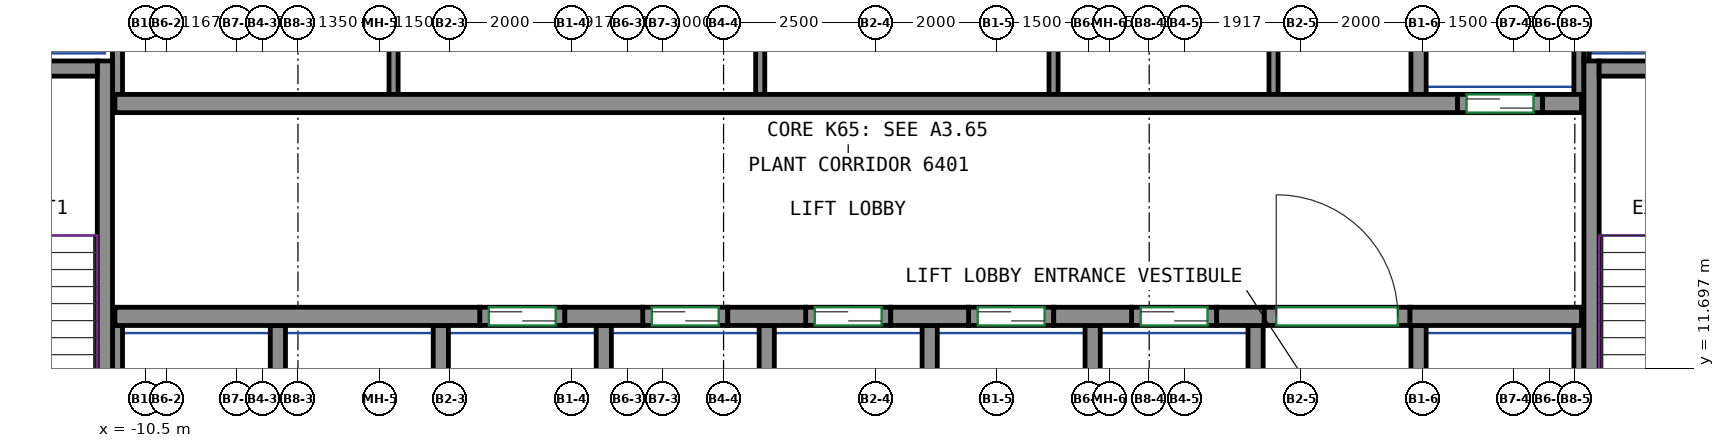
"""IFC4 building model, lengths in metres.
Left out: names, types, materials, properties, quantities, classifications, styles, units other than length and angle.
Written with IfcOpenShell. Run it as: python <this file> out.ifc"""

import sys

from ifc_helpers import new_model, si_unit, direction, frame, frame_2d, origin, place, context, subcontext, project, spatial, rectangle, extrude, source, transform, mapped, element, fill, save


model = new_model("IFC4")
c1 = context("Model", 3, precision=1e-05, world=origin(), true_north=direction((0.0, 1.0)))
c2 = subcontext(c1, "Body", "Model", "MODEL_VIEW")
j1 = project(units=[si_unit("LENGTHUNIT", "METRE"), si_unit("PLANEANGLEUNIT", "RADIAN")], contexts=[c1])
p1 = place(None, origin())
s1 = spatial("IfcSite", under=j1, at=p1, CompositionType="ELEMENT")
p2 = place(p1, origin())
s2 = spatial("IfcBuilding", under=s1, at=p2, CompositionType="ELEMENT")
p3 = place(p2, frame((0.0, 0.0, 262.8)))
s3 = spatial("IfcBuildingStorey", under=s2, at=p3, CompositionType="ELEMENT", Elevation=262.8)
m1 = source(origin(), c2, "Body", "SweptSolid", [
    extrude(rectangle(XDim=7.75, YDim=0.25, at=frame_2d((3.875, 0.0))), origin(), (0.0, 0.0, 1.0), 3.8),
])
p4 = place(p3, frame((-11.175, 9.0, 0.0), z_axis=(0.0, 0.0, 1.0), x_axis=(0.0, 1.0, 0.0)))
e1 = element("IfcWall", 1, at=p4, inside=s3, PredefinedType="SHEAR", context=c2, shape_type="MappedRepresentation", body=[
    mapped(m1, transform((0.0, 0.0, 0.0))),
])
m2 = source(origin(), c2, "Body", "SweptSolid", [
    extrude(rectangle(XDim=3.7, YDim=0.25, at=frame_2d((1.85, 0.0))), origin(), (0.0, 0.0, 1.0), 3.8),
])
p5 = place(p3, frame((-15.0, 16.625, 0.0), z_axis=(0.0, 0.0, 1.0), x_axis=(1.0, 0.0, 0.0)))
e2 = element("IfcWall", 2, at=p5, inside=s3, PredefinedType="SHEAR", context=c2, shape_type="MappedRepresentation", body=[
    mapped(m2, transform((0.0, 0.0, 0.0))),
])
p6 = place(p3, frame((13.275, 9.0, 0.0), z_axis=(0.0, 0.0, 1.0), x_axis=(0.0, 1.0, 0.0)))
e3 = element("IfcWall", 3, at=p6, inside=s3, PredefinedType="SHEAR", context=c2, shape_type="MappedRepresentation", body=[
    mapped(m1, transform((0.0, 0.0, 0.0))),
])
m3 = source(origin(), c2, "Body", "SweptSolid", [
    extrude(rectangle(XDim=3.7, YDim=0.25, at=frame_2d((1.85, 0.0))), origin(), (0.0, 0.0, 1.0), 3.8),
])
p7 = place(p3, frame((13.4, 16.625, 0.0), z_axis=(0.0, 0.0, 1.0), x_axis=(1.0, 0.0, 0.0)))
e4 = element("IfcWall", 4, at=p7, inside=s3, PredefinedType="SHEAR", context=c2, shape_type="MappedRepresentation", body=[
    mapped(m3, transform((0.0, 0.0, 0.0))),
])
m4 = source(origin(), c2, "Body", "SweptSolid", [
    extrude(rectangle(XDim=6.0, YDim=0.3, at=frame_2d((3.0, 0.0))), origin(), (0.0, 0.0, 1.0), 3.8),
])
p8 = place(p3, frame((-11.01, 12.55, 0.0), z_axis=(0.0, 0.0, 1.0), x_axis=(1.0, 0.0, 0.0)))
e5 = element("IfcWall", 5, at=p8, inside=s3, PredefinedType="SHEAR", context=c2, shape_type="MappedRepresentation", body=[
    mapped(m4, transform((0.0, 0.0, 0.0))),
])
m5 = source(origin(), c2, "Body", "SweptSolid", [
    extrude(rectangle(XDim=1.28, YDim=0.3, at=frame_2d((0.64, 0.0))), origin(), (0.0, 0.0, 1.0), 3.8),
])
for number, where, z_axis, x_axis in (
    (6, (-3.61, 12.55, 0.0), (0.0, 0.0, 1.0), (1.0, 0.0, 0.0)),
    (7, (-0.93, 12.55, 0.0), (0.0, 0.0, 1.0), (1.0, 0.0, 0.0)),
    (8, (1.75, 12.55, 0.0), (0.0, 0.0, 1.0), (1.0, 0.0, 0.0)),
    (9, (4.43, 12.55, 0.0), (0.0, 0.0, 1.0), (1.0, 0.0, 0.0)),
):
    element("IfcWall", number, at=place(p3, frame(where, z_axis=z_axis, x_axis=x_axis)), inside=s3, PredefinedType="SHEAR", context=c2, shape_type="MappedRepresentation", body=[
        mapped(m5, transform((0.0, 0.0, 0.0))),
    ])
m6 = source(origin(), c2, "Body", "SweptSolid", [
    extrude(rectangle(XDim=0.78, YDim=0.3, at=frame_2d((0.39, 0.0))), origin(), (0.0, 0.0, 1.0), 3.8),
])
p9 = place(p3, frame((7.11, 12.55, 0.0), z_axis=(0.0, 0.0, 1.0), x_axis=(1.0, 0.0, 0.0)))
e10 = element("IfcWall", 10, at=p9, inside=s3, PredefinedType="SHEAR", context=c2, shape_type="MappedRepresentation", body=[
    mapped(m6, transform((0.0, 0.0, 0.0))),
])
m7 = source(origin(), c2, "Body", "SweptSolid", [
    extrude(rectangle(XDim=2.82, YDim=0.3, at=frame_2d((1.41, 0.0))), origin(), (0.0, 0.0, 1.0), 3.8),
])
p10 = place(p3, frame((10.29, 12.55, 0.0), z_axis=(0.0, 0.0, 1.0), x_axis=(1.0, 0.0, 0.0)))
e11 = element("IfcWall", 11, at=p10, inside=s3, PredefinedType="SHEAR", context=c2, shape_type="MappedRepresentation", body=[
    mapped(m7, transform((0.0, 0.0, 0.0))),
])
m8 = source(origin(), c2, "Body", "SweptSolid", [
    extrude(rectangle(XDim=22.08, YDim=0.3, at=frame_2d((11.04, 0.0))), origin(), (0.0, 0.0, 1.0), 3.8),
])
p11 = place(p3, frame((-11.01, 16.05, 0.0), z_axis=(0.0, 0.0, 1.0), x_axis=(1.0, 0.0, 0.0)))
e12 = element("IfcWall", 12, at=p11, inside=s3, PredefinedType="SHEAR", context=c2, shape_type="MappedRepresentation", body=[
    mapped(m8, transform((0.0, 0.0, 0.0))),
])
m9 = source(origin(), c2, "Body", "SweptSolid", [
    extrude(rectangle(XDim=0.64, YDim=0.3, at=frame_2d((0.32, 0.0))), origin(), (0.0, 0.0, 1.0), 3.8),
])
p12 = place(p3, frame((12.47, 16.05, 0.0), z_axis=(0.0, 0.0, 1.0), x_axis=(1.0, 0.0, 0.0)))
e13 = element("IfcWall", 13, at=p12, inside=s3, PredefinedType="SHEAR", context=c2, shape_type="MappedRepresentation", body=[
    mapped(m9, transform((0.0, 0.0, 0.0))),
])
m10 = source(origin(), c2, "Body", "SweptSolid", [
    extrude(rectangle(XDim=1.4, YDim=0.3, at=frame_2d((0.7, 0.0))), origin(), (0.0, 0.0, 1.0), 3.8),
])
p13 = place(p3, frame((-5.01, 12.55, 0.0), z_axis=(0.0, 0.0, 1.0), x_axis=(1.0, 0.0, 0.0)))
e14 = element("IfcWall", 14, at=p13, inside=s3, PredefinedType="PARTITIONING", context=c2, shape_type="MappedRepresentation", body=[
    mapped(m10, transform((0.0, 0.0, 0.0))),
])
p14 = place(p13, frame((0.15, 0.0, 0.0)))
e15 = element("IfcOpeningElement", 15, at=p14, cuts=e14, PredefinedType="OPENING", context=c2, shape_type="SweptSolid", body=[
    extrude(rectangle(XDim=1.1, YDim=2.1, at=frame_2d((0.55, 1.05))), frame((0.0, 0.16, 0.0), z_axis=(0.0, -1.0, 0.0), x_axis=(1.0, 0.0, 0.0)), (0.0, 0.0, 1.0), 0.32),
])
m11 = source(origin(), c2, "Body", "SweptSolid", [
    extrude(rectangle(XDim=1.4, YDim=0.3, at=frame_2d((0.7, 0.0))), origin(), (0.0, 0.0, 1.0), 3.8),
])
p15 = place(p3, frame((-2.33, 12.55, 0.0), z_axis=(0.0, 0.0, 1.0), x_axis=(1.0, 0.0, 0.0)))
e16 = element("IfcWall", 16, at=p15, inside=s3, PredefinedType="PARTITIONING", context=c2, shape_type="MappedRepresentation", body=[
    mapped(m11, transform((0.0, 0.0, 0.0))),
])
p16 = place(p15, frame((0.15, 0.0, 0.0)))
e17 = element("IfcOpeningElement", 17, at=p16, cuts=e16, PredefinedType="OPENING", context=c2, shape_type="SweptSolid", body=[
    extrude(rectangle(XDim=1.1, YDim=2.1, at=frame_2d((0.55, 1.05))), frame((0.0, 0.16, 0.0), z_axis=(0.0, -1.0, 0.0), x_axis=(1.0, 0.0, 0.0)), (0.0, 0.0, 1.0), 0.32),
])
p17 = place(p3, frame((0.35, 12.55, 0.0), z_axis=(0.0, 0.0, 1.0), x_axis=(1.0, 0.0, 0.0)))
e18 = element("IfcWall", 18, at=p17, inside=s3, PredefinedType="PARTITIONING", context=c2, shape_type="MappedRepresentation", body=[
    mapped(m10, transform((0.0, 0.0, 0.0))),
])
p18 = place(p17, frame((0.15, 0.0, 0.0)))
e19 = element("IfcOpeningElement", 19, at=p18, cuts=e18, PredefinedType="OPENING", context=c2, shape_type="SweptSolid", body=[
    extrude(rectangle(XDim=1.1, YDim=2.1, at=frame_2d((0.55, 1.05))), frame((0.0, 0.16, 0.0), z_axis=(0.0, -1.0, 0.0), x_axis=(1.0, 0.0, 0.0)), (0.0, 0.0, 1.0), 0.32),
])
p19 = place(p3, frame((3.03, 12.55, 0.0), z_axis=(0.0, 0.0, 1.0), x_axis=(1.0, 0.0, 0.0)))
e20 = element("IfcWall", 20, at=p19, inside=s3, PredefinedType="PARTITIONING", context=c2, shape_type="MappedRepresentation", body=[
    mapped(m10, transform((0.0, 0.0, 0.0))),
])
p20 = place(p19, frame((0.15, 0.0, 0.0)))
e21 = element("IfcOpeningElement", 21, at=p20, cuts=e20, PredefinedType="OPENING", context=c2, shape_type="SweptSolid", body=[
    extrude(rectangle(XDim=1.1, YDim=2.1, at=frame_2d((0.55, 1.05))), frame((0.0, 0.16, 0.0), z_axis=(0.0, -1.0, 0.0), x_axis=(1.0, 0.0, 0.0)), (0.0, 0.0, 1.0), 0.32),
])
p21 = place(p3, frame((5.71, 12.55, 0.0), z_axis=(0.0, 0.0, 1.0), x_axis=(1.0, 0.0, 0.0)))
e22 = element("IfcWall", 22, at=p21, inside=s3, PredefinedType="PARTITIONING", context=c2, shape_type="MappedRepresentation", body=[
    mapped(m11, transform((0.0, 0.0, 0.0))),
])
p22 = place(p21, frame((0.15, 0.0, 0.0)))
e23 = element("IfcOpeningElement", 23, at=p22, cuts=e22, PredefinedType="OPENING", context=c2, shape_type="SweptSolid", body=[
    extrude(rectangle(XDim=1.1, YDim=2.1, at=frame_2d((0.55, 1.05))), frame((0.0, 0.16, 0.0), z_axis=(0.0, -1.0, 0.0), x_axis=(1.0, 0.0, 0.0)), (0.0, 0.0, 1.0), 0.32),
])
p23 = place(p3, frame((11.07, 16.05, 0.0), z_axis=(0.0, 0.0, 1.0), x_axis=(1.0, 0.0, 0.0)))
e24 = element("IfcWall", 24, at=p23, inside=s3, PredefinedType="PARTITIONING", context=c2, shape_type="MappedRepresentation", body=[
    mapped(m10, transform((0.0, 0.0, 0.0))),
])
p24 = place(p23, frame((0.15, 0.0, 0.0)))
e25 = element("IfcOpeningElement", 25, at=p24, cuts=e24, PredefinedType="OPENING", context=c2, shape_type="SweptSolid", body=[
    extrude(rectangle(XDim=1.1, YDim=2.1, at=frame_2d((0.55, 1.05))), frame((0.0, 0.16, 0.0), z_axis=(0.0, -1.0, 0.0), x_axis=(1.0, 0.0, 0.0)), (0.0, 0.0, 1.0), 0.32),
])
m12 = source(origin(), c2, "Body", "SweptSolid", [
    extrude(rectangle(XDim=2.4, YDim=0.3, at=frame_2d((1.2, 0.0))), origin(), (0.0, 0.0, 1.0), 3.8),
])
p25 = place(p3, frame((7.89, 12.55, 0.0), z_axis=(0.0, 0.0, 1.0), x_axis=(1.0, 0.0, 0.0)))
e26 = element("IfcWall", 26, at=p25, inside=s3, PredefinedType="PARTITIONING", context=c2, shape_type="MappedRepresentation", body=[
    mapped(m12, transform((0.0, 0.0, 0.0))),
])
p26 = place(p25, frame((0.2, 0.0, 0.0)))
e27 = element("IfcOpeningElement", 27, at=p26, cuts=e26, PredefinedType="OPENING", context=c2, shape_type="SweptSolid", body=[
    extrude(rectangle(XDim=2.0, YDim=2.1, at=frame_2d((1.0, 1.05))), frame((0.0, 0.16, 0.0), z_axis=(0.0, -1.0, 0.0), x_axis=(1.0, 0.0, 0.0)), (0.0, 0.0, 1.0), 0.32),
])
m13 = source(origin(), c2, "Body", "SweptSolid", [
    extrude(rectangle(XDim=3.275, YDim=0.165, at=frame_2d((1.638, 0.0))), origin(), (0.0, 0.0, 1.0), 3.8),
])
p27 = place(p3, frame((13.067, 16.2, 0.0), z_axis=(0.0, 0.0, 1.0), x_axis=(0.0, 1.0, 0.0)))
e28 = element("IfcWall", 28, at=p27, inside=s3, PredefinedType="PARTITIONING", context=c2, shape_type="MappedRepresentation", body=[
    mapped(m13, transform((0.0, 0.0, 0.0))),
])
m14 = source(origin(), c2, "Body", "SweptSolid", [
    extrude(rectangle(XDim=4.8, YDim=0.165, at=frame_2d((2.4, 0.0))), origin(), (0.0, 0.0, 1.0), 3.8),
])
p28 = place(p3, frame((-10.968, 16.2, 0.0), z_axis=(0.0, 0.0, 1.0), x_axis=(0.0, 1.0, 0.0)))
e29 = element("IfcWall", 29, at=p28, inside=s3, PredefinedType="PARTITIONING", context=c2, shape_type="MappedRepresentation", body=[
    mapped(m14, transform((0.0, 0.0, 0.0))),
])
m15 = source(origin(), c2, "Body", "SweptSolid", [
    extrude(rectangle(XDim=3.275, YDim=0.25, at=frame_2d((1.638, 0.0))), origin(), (0.0, 0.0, 1.0), 3.8),
])
p29 = place(p3, frame((10.43, 16.2, 0.0), z_axis=(0.0, 0.0, 1.0), x_axis=(0.0, 1.0, 0.0)))
e30 = element("IfcWall", 30, at=p29, inside=s3, PredefinedType="PARTITIONING", context=c2, shape_type="MappedRepresentation", body=[
    mapped(m15, transform((0.0, 0.0, 0.0))),
])
m16 = source(origin(), c2, "Body", "SweptSolid", [
    extrude(rectangle(XDim=2.725, YDim=0.085, at=frame_2d((1.363, 0.0))), origin(), (0.0, 0.0, 1.0), 3.8),
])
p30 = place(p3, frame((13.192, 16.75, 0.0), z_axis=(0.0, 0.0, 1.0), x_axis=(0.0, 1.0, 0.0)))
e31 = element("IfcWall", 31, at=p30, inside=s3, PredefinedType="PARTITIONING", context=c2, shape_type="MappedRepresentation", body=[
    mapped(m16, transform((0.0, 0.0, 0.0))),
])
m17 = source(origin(), c2, "Body", "SweptSolid", [
    extrude(rectangle(XDim=3.4, YDim=0.25, at=frame_2d((1.7, 0.0))), origin(), (0.0, 0.0, 1.0), 3.8),
])
p31 = place(p3, frame((10.43, 9.0, 0.0), z_axis=(0.0, 0.0, 1.0), x_axis=(0.0, 1.0, 0.0)))
e32 = element("IfcWall", 32, at=p31, inside=s3, PredefinedType="PARTITIONING", context=c2, shape_type="MappedRepresentation", body=[
    mapped(m17, transform((0.0, 0.0, 0.0))),
])
m18 = source(origin(), c2, "Body", "SweptSolid", [
    extrude(rectangle(XDim=3.4, YDim=0.165, at=frame_2d((1.7, 0.0))), origin(), (0.0, 0.0, 1.0), 3.8),
])
p32 = place(p3, frame((13.067, 9.0, 0.0), z_axis=(0.0, 0.0, 1.0), x_axis=(0.0, 1.0, 0.0)))
e33 = element("IfcWall", 33, at=p32, inside=s3, PredefinedType="PARTITIONING", context=c2, shape_type="MappedRepresentation", body=[
    mapped(m18, transform((0.0, 0.0, 0.0))),
])
for number, where, z_axis, x_axis in (
    (34, (2.39, 9.0, 0.0), (0.0, 0.0, 1.0), (0.0, 1.0, 0.0)),
    (35, (5.07, 9.0, 0.0), (0.0, 0.0, 1.0), (0.0, 1.0, 0.0)),
    (36, (7.75, 9.0, 0.0), (0.0, 0.0, 1.0), (0.0, 1.0, 0.0)),
    (37, (-0.29, 9.0, 0.0), (0.0, 0.0, 1.0), (0.0, 1.0, 0.0)),
):
    element("IfcWall", number, at=place(p3, frame(where, z_axis=z_axis, x_axis=x_axis)), inside=s3, PredefinedType="PARTITIONING", context=c2, shape_type="MappedRepresentation", body=[
        mapped(m17, transform((0.0, 0.0, 0.0))),
    ])
p33 = place(p3, frame((-10.968, 9.0, 0.0), z_axis=(0.0, 0.0, 1.0), x_axis=(0.0, 1.0, 0.0)))
e38 = element("IfcWall", 38, at=p33, inside=s3, PredefinedType="PARTITIONING", context=c2, shape_type="MappedRepresentation", body=[
    mapped(m18, transform((0.0, 0.0, 0.0))),
])
for number, where, z_axis, x_axis in (
    (39, (-2.97, 9.0, 0.0), (0.0, 0.0, 1.0), (0.0, 1.0, 0.0)),
    (40, (-5.65, 9.0, 0.0), (0.0, 0.0, 1.0), (0.0, 1.0, 0.0)),
    (41, (-8.33, 9.0, 0.0), (0.0, 0.0, 1.0), (0.0, 1.0, 0.0)),
):
    element("IfcWall", number, at=place(p3, frame(where, z_axis=z_axis, x_axis=x_axis)), inside=s3, PredefinedType="PARTITIONING", context=c2, shape_type="MappedRepresentation", body=[
        mapped(m17, transform((0.0, 0.0, 0.0))),
    ])
m19 = source(origin(), c2, "Body", "SweptSolid", [
    extrude(rectangle(XDim=4.8, YDim=0.15, at=frame_2d((2.4, 0.0))), origin(), (0.0, 0.0, 1.0), 3.8),
])
for number, where, z_axis, x_axis in (
    (42, (-6.427, 16.2, 0.0), (0.0, 0.0, 1.0), (0.0, 1.0, 0.0)),
    (43, (-0.397, 16.2, 0.0), (0.0, 0.0, 1.0), (0.0, 1.0, 0.0)),
    (44, (4.427, 16.2, 0.0), (0.0, 0.0, 1.0), (0.0, 1.0, 0.0)),
    (45, (8.045, 16.2, 0.0), (0.0, 0.0, 1.0), (0.0, 1.0, 0.0)),
):
    element("IfcWall", number, at=place(p3, frame(where, z_axis=z_axis, x_axis=x_axis)), inside=s3, PredefinedType="PARTITIONING", context=c2, shape_type="MappedRepresentation", body=[
        mapped(m19, transform((0.0, 0.0, 0.0))),
    ])
p34 = place(p26, origin())
e46 = element("IfcDoor", 46, at=p34, inside=s3, OperationType="DOUBLE_DOOR_SINGLE_SWING", PredefinedType="DOOR", context=c2, shape_type="SweptSolid", body=[
    extrude(rectangle(XDim=2.0, YDim=2.1, at=frame_2d((1.0, 1.05))), frame((0.0, 0.025, 0.0), z_axis=(0.0, -1.0, 0.0), x_axis=(1.0, 0.0, 0.0)), (0.0, 0.0, 1.0), 0.05),
])
fill(e27, e46)
p35 = place(p14, origin())
e47 = element("IfcDoor", 47, at=p35, inside=s3, OperationType="DOUBLE_DOOR_SLIDING", PredefinedType="DOOR", context=c2, shape_type="SweptSolid", body=[
    extrude(rectangle(XDim=1.1, YDim=2.1, at=frame_2d((0.55, 1.05))), frame((0.0, 0.025, 0.0), z_axis=(0.0, -1.0, 0.0), x_axis=(1.0, 0.0, 0.0)), (0.0, 0.0, 1.0), 0.05),
])
fill(e15, e47)
p36 = place(p16, origin())
e48 = element("IfcDoor", 48, at=p36, inside=s3, OperationType="DOUBLE_DOOR_SLIDING", PredefinedType="DOOR", context=c2, shape_type="SweptSolid", body=[
    extrude(rectangle(XDim=1.1, YDim=2.1, at=frame_2d((0.55, 1.05))), frame((0.0, 0.025, 0.0), z_axis=(0.0, -1.0, 0.0), x_axis=(1.0, 0.0, 0.0)), (0.0, 0.0, 1.0), 0.05),
])
fill(e17, e48)
p37 = place(p18, origin())
e49 = element("IfcDoor", 49, at=p37, inside=s3, OperationType="DOUBLE_DOOR_SLIDING", PredefinedType="DOOR", context=c2, shape_type="SweptSolid", body=[
    extrude(rectangle(XDim=1.1, YDim=2.1, at=frame_2d((0.55, 1.05))), frame((0.0, 0.025, 0.0), z_axis=(0.0, -1.0, 0.0), x_axis=(1.0, 0.0, 0.0)), (0.0, 0.0, 1.0), 0.05),
])
fill(e19, e49)
p38 = place(p20, origin())
e50 = element("IfcDoor", 50, at=p38, inside=s3, OperationType="DOUBLE_DOOR_SLIDING", PredefinedType="DOOR", context=c2, shape_type="SweptSolid", body=[
    extrude(rectangle(XDim=1.1, YDim=2.1, at=frame_2d((0.55, 1.05))), frame((0.0, 0.025, 0.0), z_axis=(0.0, -1.0, 0.0), x_axis=(1.0, 0.0, 0.0)), (0.0, 0.0, 1.0), 0.05),
])
fill(e21, e50)
p39 = place(p22, origin())
e51 = element("IfcDoor", 51, at=p39, inside=s3, OperationType="DOUBLE_DOOR_SLIDING", PredefinedType="DOOR", context=c2, shape_type="SweptSolid", body=[
    extrude(rectangle(XDim=1.1, YDim=2.1, at=frame_2d((0.55, 1.05))), frame((0.0, 0.025, 0.0), z_axis=(0.0, -1.0, 0.0), x_axis=(1.0, 0.0, 0.0)), (0.0, 0.0, 1.0), 0.05),
])
fill(e23, e51)
p40 = place(p24, origin())
e52 = element("IfcDoor", 52, at=p40, inside=s3, OperationType="DOUBLE_DOOR_SLIDING", PredefinedType="DOOR", context=c2, shape_type="SweptSolid", body=[
    extrude(rectangle(XDim=1.1, YDim=2.1, at=frame_2d((0.55, 1.05))), frame((0.0, 0.025, 0.0), z_axis=(0.0, -1.0, 0.0), x_axis=(1.0, 0.0, 0.0)), (0.0, 0.0, 1.0), 0.05),
])
fill(e25, e52)
save(model, sys.argv[1])
